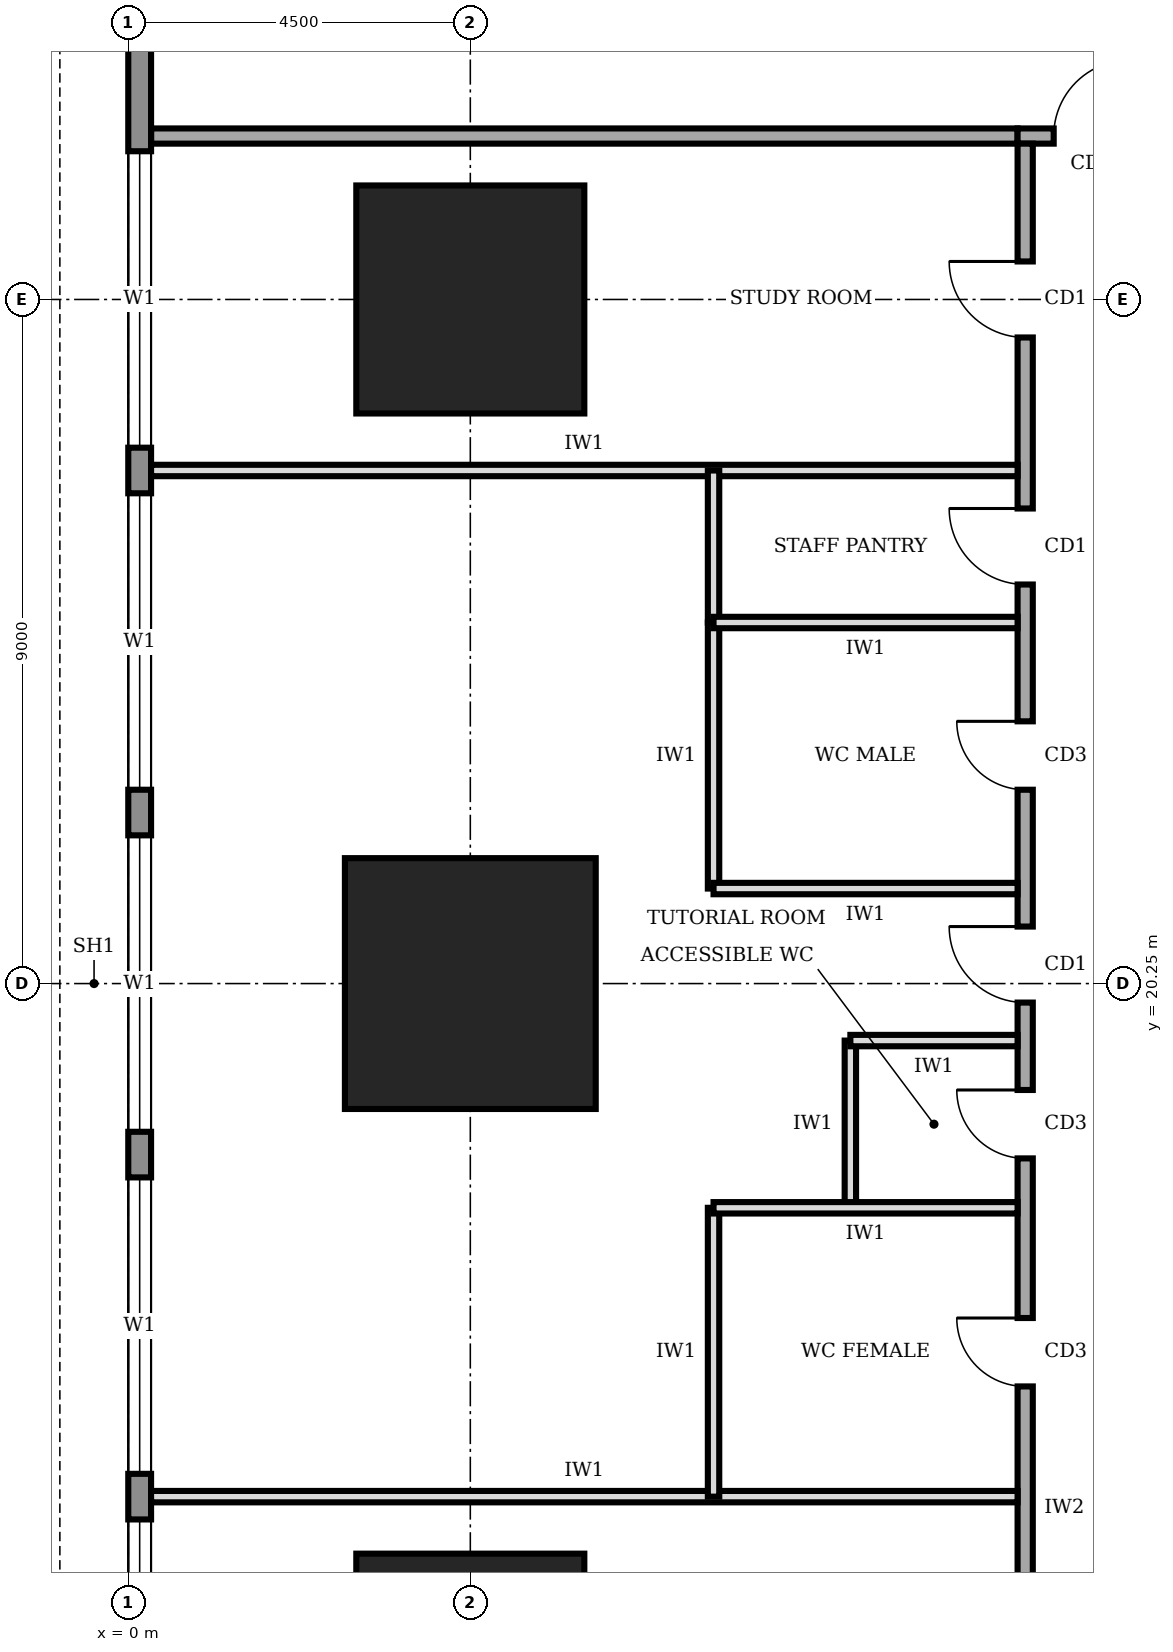
"""IFC4 building model, lengths in metres.
Left out: names, types, materials, properties, quantities, classifications, styles, units other than length and angle.
Written with IfcOpenShell. Run it as: python <this file> out.ifc"""

import sys

from ifc_helpers import new_model, si_unit, direction, frame, frame_2d, origin, origin_2d, place, context, subcontext, project, spatial, rectangle, extrude, element, fill, save


model = new_model("IFC4")
c1 = context("Model", 3, precision=1e-05, world=origin(), true_north=direction((0.0, 1.0)))
c2 = subcontext(c1, "Body", "Model", "MODEL_VIEW")
j1 = project(units=[si_unit("LENGTHUNIT", "METRE"), si_unit("PLANEANGLEUNIT", "RADIAN")], contexts=[c1])
p1 = place(None, origin())
s1 = spatial("IfcSite", under=j1, at=p1, CompositionType="ELEMENT")
p2 = place(p1, origin())
s2 = spatial("IfcBuilding", under=s1, at=p2, CompositionType="ELEMENT")
p3 = place(p2, frame((0.0, 0.0, 37.0)))
s3 = spatial("IfcBuildingStorey", under=s2, at=p3, CompositionType="ELEMENT", Elevation=37.0)
p4 = place(p3, frame((4.5, 11.25, 0.0), z_axis=(0.0, 0.0, 1.0), x_axis=(1.0, 0.0, 0.0)))
e1 = element("IfcColumn", 1, at=p4, inside=s3, PredefinedType="COLUMN", context=c2, shape_type="SweptSolid", body=[
    extrude(rectangle(XDim=3.0, YDim=3.0, at=origin_2d()), origin(), (0.0, 0.0, 1.0), 4.0),
])
p5 = place(p3, frame((4.5, 20.25, 0.0), z_axis=(0.0, 0.0, 1.0), x_axis=(1.0, 0.0, 0.0)))
e2 = element("IfcColumn", 2, at=p5, inside=s3, PredefinedType="COLUMN", context=c2, shape_type="SweptSolid", body=[
    extrude(rectangle(XDim=3.3, YDim=3.3, at=origin_2d()), origin(), (0.0, 0.0, 1.0), 4.0),
])
p6 = place(p3, frame((4.5, 29.25, 0.0), z_axis=(0.0, 0.0, 1.0), x_axis=(1.0, 0.0, 0.0)))
e3 = element("IfcColumn", 3, at=p6, inside=s3, PredefinedType="COLUMN", context=c2, shape_type="SweptSolid", body=[
    extrude(rectangle(XDim=3.0, YDim=3.0, at=origin_2d()), origin(), (0.0, 0.0, 1.0), 4.0),
])
p7 = place(p3, frame((0.15, 35.98, 0.0), z_axis=(0.0, 0.0, 1.0), x_axis=(0.0, -1.0, 0.0)))
e4 = element("IfcWall", 4, at=p7, inside=s3, PredefinedType="STANDARD", context=c2, shape_type="SweptSolid", body=[
    extrude(rectangle(XDim=31.46, YDim=0.3, at=frame_2d((15.73, 0.0))), origin(), (0.0, 0.0, 1.0), 3.75),
])
p8 = place(p7, frame((27.28, 0.0, 0.9)))
e5 = element("IfcOpeningElement", 5, at=p8, cuts=e4, PredefinedType="OPENING", context=c2, shape_type="SweptSolid", body=[
    extrude(rectangle(XDim=3.9, YDim=2.2, at=frame_2d((1.95, 1.1))), frame((0.0, 0.16, 0.0), z_axis=(0.0, -1.0, 0.0), x_axis=(1.0, 0.0, 0.0)), (0.0, 0.0, 1.0), 0.32),
])
p9 = place(p7, frame((22.78, 0.0, 0.9)))
e6 = element("IfcOpeningElement", 6, at=p9, cuts=e4, PredefinedType="OPENING", context=c2, shape_type="SweptSolid", body=[
    extrude(rectangle(XDim=3.9, YDim=2.2, at=frame_2d((1.95, 1.1))), frame((0.0, 0.16, 0.0), z_axis=(0.0, -1.0, 0.0), x_axis=(1.0, 0.0, 0.0)), (0.0, 0.0, 1.0), 0.32),
])
p10 = place(p7, frame((18.28, 0.0, 0.9)))
e7 = element("IfcOpeningElement", 7, at=p10, cuts=e4, PredefinedType="OPENING", context=c2, shape_type="SweptSolid", body=[
    extrude(rectangle(XDim=3.9, YDim=2.2, at=frame_2d((1.95, 1.1))), frame((0.0, 0.16, 0.0), z_axis=(0.0, -1.0, 0.0), x_axis=(1.0, 0.0, 0.0)), (0.0, 0.0, 1.0), 0.32),
])
p11 = place(p7, frame((13.78, 0.0, 0.9)))
e8 = element("IfcOpeningElement", 8, at=p11, cuts=e4, PredefinedType="OPENING", context=c2, shape_type="SweptSolid", body=[
    extrude(rectangle(XDim=3.9, YDim=2.2, at=frame_2d((1.95, 1.1))), frame((0.0, 0.16, 0.0), z_axis=(0.0, -1.0, 0.0), x_axis=(1.0, 0.0, 0.0)), (0.0, 0.0, 1.0), 0.32),
])
p12 = place(p7, frame((9.28, 0.0, 0.9)))
e9 = element("IfcOpeningElement", 9, at=p12, cuts=e4, PredefinedType="OPENING", context=c2, shape_type="SweptSolid", body=[
    extrude(rectangle(XDim=3.9, YDim=2.2, at=frame_2d((1.95, 1.1))), frame((0.0, 0.16, 0.0), z_axis=(0.0, -1.0, 0.0), x_axis=(1.0, 0.0, 0.0)), (0.0, 0.0, 1.0), 0.32),
])
p13 = place(p7, frame((4.78, 0.0, 0.9)))
e10 = element("IfcOpeningElement", 10, at=p13, cuts=e4, PredefinedType="OPENING", context=c2, shape_type="SweptSolid", body=[
    extrude(rectangle(XDim=3.9, YDim=2.2, at=frame_2d((1.95, 1.1))), frame((0.0, 0.16, 0.0), z_axis=(0.0, -1.0, 0.0), x_axis=(1.0, 0.0, 0.0)), (0.0, 0.0, 1.0), 0.32),
])
p14 = place(p3, frame((30.1, 31.4, 0.0), z_axis=(0.0, 0.0, 1.0), x_axis=(-1.0, 0.0, 0.0)))
e11 = element("IfcWall", 11, at=p14, inside=s3, PredefinedType="SOLIDWALL", context=c2, shape_type="SweptSolid", body=[
    extrude(rectangle(XDim=18.4, YDim=0.2, at=frame_2d((9.2, 0.0))), origin(), (0.0, 0.0, 1.0), 3.75),
])
p15 = place(p14, frame((16.925, 0.0, 0.0)))
e12 = element("IfcOpeningElement", 12, at=p15, cuts=e11, PredefinedType="OPENING", context=c2, shape_type="SweptSolid", body=[
    extrude(rectangle(XDim=1.0, YDim=2.1, at=frame_2d((0.5, 1.05))), frame((0.0, 0.11, 0.0), z_axis=(0.0, -1.0, 0.0), x_axis=(1.0, 0.0, 0.0)), (0.0, 0.0, 1.0), 0.22),
])
p16 = place(p14, frame((13.85, 0.0, 0.0)))
e13 = element("IfcOpeningElement", 13, at=p16, cuts=e11, PredefinedType="OPENING", context=c2, shape_type="SweptSolid", body=[
    extrude(rectangle(XDim=1.0, YDim=2.1, at=frame_2d((0.5, 1.05))), frame((0.0, 0.11, 0.0), z_axis=(0.0, -1.0, 0.0), x_axis=(1.0, 0.0, 0.0)), (0.0, 0.0, 1.0), 0.22),
])
p17 = place(p14, frame((7.1, 0.0, 0.0)))
e14 = element("IfcOpeningElement", 14, at=p17, cuts=e11, PredefinedType="OPENING", context=c2, shape_type="SweptSolid", body=[
    extrude(rectangle(XDim=1.0, YDim=2.1, at=frame_2d((0.5, 1.05))), frame((0.0, 0.11, 0.0), z_axis=(0.0, -1.0, 0.0), x_axis=(1.0, 0.0, 0.0)), (0.0, 0.0, 1.0), 0.22),
])
p18 = place(p14, frame((0.55, 0.0, 0.0)))
e15 = element("IfcOpeningElement", 15, at=p18, cuts=e11, PredefinedType="OPENING", context=c2, shape_type="SweptSolid", body=[
    extrude(rectangle(XDim=1.8, YDim=2.1, at=frame_2d((0.9, 1.05))), frame((0.0, 0.11, 0.0), z_axis=(0.0, -1.0, 0.0), x_axis=(1.0, 0.0, 0.0)), (0.0, 0.0, 1.0), 0.22),
])
p19 = place(p3, frame((11.8, 31.3, 0.0), z_axis=(0.0, 0.0, 1.0), x_axis=(0.0, -1.0, 0.0)))
e16 = element("IfcWall", 16, at=p19, inside=s3, PredefinedType="SOLIDWALL", context=c2, shape_type="SweptSolid", body=[
    extrude(rectangle(XDim=22.3, YDim=0.2, at=frame_2d((11.15, 0.0))), origin(), (0.0, 0.0, 1.0), 3.75),
])
p20 = place(p19, frame((19.55, 0.0, 0.0)))
e17 = element("IfcOpeningElement", 17, at=p20, cuts=e16, PredefinedType="OPENING", context=c2, shape_type="SweptSolid", body=[
    extrude(rectangle(XDim=1.0, YDim=2.1, at=frame_2d((0.5, 1.05))), frame((0.0, 0.11, 0.0), z_axis=(0.0, -1.0, 0.0), x_axis=(1.0, 0.0, 0.0)), (0.0, 0.0, 1.0), 0.22),
])
p21 = place(p19, frame((15.45, 0.0, 0.0)))
e18 = element("IfcOpeningElement", 18, at=p21, cuts=e16, PredefinedType="OPENING", context=c2, shape_type="SweptSolid", body=[
    extrude(rectangle(XDim=0.9, YDim=2.1, at=frame_2d((0.45, 1.05))), frame((0.0, 0.11, 0.0), z_axis=(0.0, -1.0, 0.0), x_axis=(1.0, 0.0, 0.0)), (0.0, 0.0, 1.0), 0.22),
])
p22 = place(p19, frame((12.45, 0.0, 0.0)))
e19 = element("IfcOpeningElement", 19, at=p22, cuts=e16, PredefinedType="OPENING", context=c2, shape_type="SweptSolid", body=[
    extrude(rectangle(XDim=0.9, YDim=2.1, at=frame_2d((0.45, 1.05))), frame((0.0, 0.11, 0.0), z_axis=(0.0, -1.0, 0.0), x_axis=(1.0, 0.0, 0.0)), (0.0, 0.0, 1.0), 0.22),
])
p23 = place(p19, frame((7.6, 0.0, 0.0)))
e20 = element("IfcOpeningElement", 20, at=p23, cuts=e16, PredefinedType="OPENING", context=c2, shape_type="SweptSolid", body=[
    extrude(rectangle(XDim=0.9, YDim=2.1, at=frame_2d((0.45, 1.05))), frame((0.0, 0.11, 0.0), z_axis=(0.0, -1.0, 0.0), x_axis=(1.0, 0.0, 0.0)), (0.0, 0.0, 1.0), 0.22),
])
p24 = place(p19, frame((4.8, 0.0, 0.0)))
e21 = element("IfcOpeningElement", 21, at=p24, cuts=e16, PredefinedType="OPENING", context=c2, shape_type="SweptSolid", body=[
    extrude(rectangle(XDim=1.0, YDim=2.1, at=frame_2d((0.5, 1.05))), frame((0.0, 0.11, 0.0), z_axis=(0.0, -1.0, 0.0), x_axis=(1.0, 0.0, 0.0)), (0.0, 0.0, 1.0), 0.22),
])
p25 = place(p19, frame((10.3, 0.0, 0.0)))
e22 = element("IfcOpeningElement", 22, at=p25, cuts=e16, PredefinedType="OPENING", context=c2, shape_type="SweptSolid", body=[
    extrude(rectangle(XDim=1.0, YDim=2.1, at=frame_2d((0.5, 1.05))), frame((0.0, 0.11, 0.0), z_axis=(0.0, -1.0, 0.0), x_axis=(1.0, 0.0, 0.0)), (0.0, 0.0, 1.0), 0.22),
])
p26 = place(p19, frame((1.55, 0.0, 0.0)))
e23 = element("IfcOpeningElement", 23, at=p26, cuts=e16, PredefinedType="OPENING", context=c2, shape_type="SweptSolid", body=[
    extrude(rectangle(XDim=1.0, YDim=2.1, at=frame_2d((0.5, 1.05))), frame((0.0, 0.11, 0.0), z_axis=(0.0, -1.0, 0.0), x_axis=(1.0, 0.0, 0.0)), (0.0, 0.0, 1.0), 0.22),
])
p27 = place(p3, frame((0.3, 31.4, 0.0), z_axis=(0.0, 0.0, 1.0), x_axis=(1.0, 0.0, 0.0)))
e24 = element("IfcWall", 24, at=p27, inside=s3, PredefinedType="SOLIDWALL", context=c2, shape_type="SweptSolid", body=[
    extrude(rectangle(XDim=11.4, YDim=0.2, at=frame_2d((5.7, 0.0))), origin(), (0.0, 0.0, 1.0), 3.75),
])
for number, where, z_axis, x_axis in (
    (25, (0.3, 13.5, 0.0), (0.0, 0.0, 1.0), (1.0, 0.0, 0.0)),
    (26, (0.3, 27.0, 0.0), (0.0, 0.0, 1.0), (1.0, 0.0, 0.0)),
):
    element("IfcWall", number, at=place(p3, frame(where, z_axis=z_axis, x_axis=x_axis)), inside=s3, PredefinedType="PARTITIONING", context=c2, shape_type="SweptSolid", body=[
        extrude(rectangle(XDim=11.4, YDim=0.15, at=frame_2d((5.7, 0.0))), origin(), (0.0, 0.0, 1.0), 3.75),
    ])
p28 = place(p3, frame((11.7, 17.3, 0.0), z_axis=(0.0, 0.0, 1.0), x_axis=(-1.0, 0.0, 0.0)))
e27 = element("IfcWall", 27, at=p28, inside=s3, PredefinedType="PARTITIONING", context=c2, shape_type="SweptSolid", body=[
    extrude(rectangle(XDim=4.0, YDim=0.15, at=frame_2d((2.0, 0.0))), origin(), (0.0, 0.0, 1.0), 3.75),
])
p29 = place(p3, frame((11.7, 19.5, 0.0), z_axis=(0.0, 0.0, 1.0), x_axis=(-1.0, 0.0, 0.0)))
e28 = element("IfcWall", 28, at=p29, inside=s3, PredefinedType="PARTITIONING", context=c2, shape_type="SweptSolid", body=[
    extrude(rectangle(XDim=2.2, YDim=0.15, at=frame_2d((1.1, 0.0))), origin(), (0.0, 0.0, 1.0), 2.85),
])
for number, where, z_axis, x_axis in (
    (29, (11.7, 21.5, 0.0), (0.0, 0.0, 1.0), (-1.0, 0.0, 0.0)),
    (30, (11.7, 25.0, 0.0), (0.0, 0.0, 1.0), (-1.0, 0.0, 0.0)),
):
    element("IfcWall", number, at=place(p3, frame(where, z_axis=z_axis, x_axis=x_axis)), inside=s3, PredefinedType="PARTITIONING", context=c2, shape_type="SweptSolid", body=[
        extrude(rectangle(XDim=4.0, YDim=0.15, at=frame_2d((2.0, 0.0))), origin(), (0.0, 0.0, 1.0), 3.75),
    ])
p30 = place(p3, frame((7.7, 13.5, 0.0), z_axis=(0.0, 0.0, 1.0), x_axis=(0.0, 1.0, 0.0)))
e31 = element("IfcWall", 31, at=p30, inside=s3, PredefinedType="PARTITIONING", context=c2, shape_type="SweptSolid", body=[
    extrude(rectangle(XDim=3.8, YDim=0.15, at=frame_2d((1.9, 0.0))), origin(), (0.0, 0.0, 1.0), 3.75),
])
p31 = place(p3, frame((9.5, 17.3, 0.0), z_axis=(0.0, 0.0, 1.0), x_axis=(0.0, 1.0, 0.0)))
e32 = element("IfcWall", 32, at=p31, inside=s3, PredefinedType="PARTITIONING", context=c2, shape_type="SweptSolid", body=[
    extrude(rectangle(XDim=2.2, YDim=0.15, at=frame_2d((1.1, 0.0))), origin(), (0.0, 0.0, 1.0), 3.75),
])
p32 = place(p3, frame((7.7, 21.5, 0.0), z_axis=(0.0, 0.0, 1.0), x_axis=(0.0, 1.0, 0.0)))
e33 = element("IfcWall", 33, at=p32, inside=s3, PredefinedType="PARTITIONING", context=c2, shape_type="SweptSolid", body=[
    extrude(rectangle(XDim=3.5, YDim=0.15, at=frame_2d((1.75, 0.0))), origin(), (0.0, 0.0, 1.0), 3.75),
])
p33 = place(p3, frame((7.7, 25.0, 0.0), z_axis=(0.0, 0.0, 1.0), x_axis=(0.0, 1.0, 0.0)))
e34 = element("IfcWall", 34, at=p33, inside=s3, PredefinedType="PARTITIONING", context=c2, shape_type="SweptSolid", body=[
    extrude(rectangle(XDim=2.0, YDim=0.15, at=frame_2d((1.0, 0.0))), origin(), (0.0, 0.0, 1.0), 3.75),
])
p34 = place(p9, origin())
e35 = element("IfcWindow", 35, at=p34, inside=s3, PartitioningType="SINGLE_PANEL", PredefinedType="WINDOW", context=c2, shape_type="SweptSolid", body=[
    extrude(rectangle(XDim=3.9, YDim=2.2, at=frame_2d((1.95, 1.1))), frame((0.0, 0.03, 0.0), z_axis=(0.0, -1.0, 0.0), x_axis=(1.0, 0.0, 0.0)), (0.0, 0.0, 1.0), 0.06),
])
fill(e6, e35)
p35 = place(p10, origin())
e36 = element("IfcWindow", 36, at=p35, inside=s3, PartitioningType="SINGLE_PANEL", PredefinedType="WINDOW", context=c2, shape_type="SweptSolid", body=[
    extrude(rectangle(XDim=3.9, YDim=2.2, at=frame_2d((1.95, 1.1))), frame((0.0, 0.03, 0.0), z_axis=(0.0, -1.0, 0.0), x_axis=(1.0, 0.0, 0.0)), (0.0, 0.0, 1.0), 0.06),
])
fill(e7, e36)
p36 = place(p11, origin())
e37 = element("IfcWindow", 37, at=p36, inside=s3, PartitioningType="SINGLE_PANEL", PredefinedType="WINDOW", context=c2, shape_type="SweptSolid", body=[
    extrude(rectangle(XDim=3.9, YDim=2.2, at=frame_2d((1.95, 1.1))), frame((0.0, 0.03, 0.0), z_axis=(0.0, -1.0, 0.0), x_axis=(1.0, 0.0, 0.0)), (0.0, 0.0, 1.0), 0.06),
])
fill(e8, e37)
p37 = place(p12, origin())
e38 = element("IfcWindow", 38, at=p37, inside=s3, PartitioningType="SINGLE_PANEL", PredefinedType="WINDOW", context=c2, shape_type="SweptSolid", body=[
    extrude(rectangle(XDim=3.9, YDim=2.2, at=frame_2d((1.95, 1.1))), frame((0.0, 0.03, 0.0), z_axis=(0.0, -1.0, 0.0), x_axis=(1.0, 0.0, 0.0)), (0.0, 0.0, 1.0), 0.06),
])
fill(e9, e38)
p38 = place(p13, origin())
e39 = element("IfcWindow", 39, at=p38, inside=s3, PartitioningType="SINGLE_PANEL", PredefinedType="WINDOW", context=c2, shape_type="SweptSolid", body=[
    extrude(rectangle(XDim=3.9, YDim=2.2, at=frame_2d((1.95, 1.1))), frame((0.0, 0.03, 0.0), z_axis=(0.0, -1.0, 0.0), x_axis=(1.0, 0.0, 0.0)), (0.0, 0.0, 1.0), 0.06),
])
fill(e10, e39)
p39 = place(p15, frame((1.0, 0.0, 0.0), z_axis=(0.0, 0.0, 1.0), x_axis=(-1.0, 0.0, 0.0)))
e40 = element("IfcDoor", 40, at=p39, inside=s3, OperationType="SINGLE_SWING_RIGHT", PredefinedType="DOOR", context=c2, shape_type="SweptSolid", body=[
    extrude(rectangle(XDim=1.0, YDim=2.1, at=frame_2d((0.5, 1.05))), frame((0.0, 0.025, 0.0), z_axis=(0.0, -1.0, 0.0), x_axis=(1.0, 0.0, 0.0)), (0.0, 0.0, 1.0), 0.05),
])
fill(e12, e40)
p40 = place(p21, frame((0.9, 0.0, 0.0), z_axis=(0.0, 0.0, 1.0), x_axis=(-1.0, 0.0, 0.0)))
e41 = element("IfcDoor", 41, at=p40, inside=s3, OperationType="SINGLE_SWING_RIGHT", PredefinedType="DOOR", context=c2, shape_type="SweptSolid", body=[
    extrude(rectangle(XDim=0.9, YDim=2.1, at=frame_2d((0.45, 1.05))), frame((0.0, 0.025, 0.0), z_axis=(0.0, -1.0, 0.0), x_axis=(1.0, 0.0, 0.0)), (0.0, 0.0, 1.0), 0.05),
])
fill(e18, e41)
p41 = place(p22, frame((0.9, 0.0, 0.0), z_axis=(0.0, 0.0, 1.0), x_axis=(-1.0, 0.0, 0.0)))
e42 = element("IfcDoor", 42, at=p41, inside=s3, OperationType="SINGLE_SWING_RIGHT", PredefinedType="DOOR", context=c2, shape_type="SweptSolid", body=[
    extrude(rectangle(XDim=0.9, YDim=2.1, at=frame_2d((0.45, 1.05))), frame((0.0, 0.025, 0.0), z_axis=(0.0, -1.0, 0.0), x_axis=(1.0, 0.0, 0.0)), (0.0, 0.0, 1.0), 0.05),
])
fill(e19, e42)
p42 = place(p23, frame((0.9, 0.0, 0.0), z_axis=(0.0, 0.0, 1.0), x_axis=(-1.0, 0.0, 0.0)))
e43 = element("IfcDoor", 43, at=p42, inside=s3, OperationType="SINGLE_SWING_RIGHT", PredefinedType="DOOR", context=c2, shape_type="SweptSolid", body=[
    extrude(rectangle(XDim=0.9, YDim=2.1, at=frame_2d((0.45, 1.05))), frame((0.0, 0.025, 0.0), z_axis=(0.0, -1.0, 0.0), x_axis=(1.0, 0.0, 0.0)), (0.0, 0.0, 1.0), 0.05),
])
fill(e20, e43)
p43 = place(p24, frame((1.0, 0.0, 0.0), z_axis=(0.0, 0.0, 1.0), x_axis=(-1.0, 0.0, 0.0)))
e44 = element("IfcDoor", 44, at=p43, inside=s3, OperationType="SINGLE_SWING_RIGHT", PredefinedType="DOOR", context=c2, shape_type="SweptSolid", body=[
    extrude(rectangle(XDim=1.0, YDim=2.1, at=frame_2d((0.5, 1.05))), frame((0.0, 0.025, 0.0), z_axis=(0.0, -1.0, 0.0), x_axis=(1.0, 0.0, 0.0)), (0.0, 0.0, 1.0), 0.05),
])
fill(e21, e44)
p44 = place(p25, frame((1.0, 0.0, 0.0), z_axis=(0.0, 0.0, 1.0), x_axis=(-1.0, 0.0, 0.0)))
e45 = element("IfcDoor", 45, at=p44, inside=s3, OperationType="SINGLE_SWING_RIGHT", PredefinedType="DOOR", context=c2, shape_type="SweptSolid", body=[
    extrude(rectangle(XDim=1.0, YDim=2.1, at=frame_2d((0.5, 1.05))), frame((0.0, 0.025, 0.0), z_axis=(0.0, -1.0, 0.0), x_axis=(1.0, 0.0, 0.0)), (0.0, 0.0, 1.0), 0.05),
])
fill(e22, e45)
p45 = place(p26, frame((1.0, 0.0, 0.0), z_axis=(0.0, 0.0, 1.0), x_axis=(-1.0, 0.0, 0.0)))
e46 = element("IfcDoor", 46, at=p45, inside=s3, OperationType="SINGLE_SWING_RIGHT", PredefinedType="DOOR", context=c2, shape_type="SweptSolid", body=[
    extrude(rectangle(XDim=1.0, YDim=2.1, at=frame_2d((0.5, 1.05))), frame((0.0, 0.025, 0.0), z_axis=(0.0, -1.0, 0.0), x_axis=(1.0, 0.0, 0.0)), (0.0, 0.0, 1.0), 0.05),
])
fill(e23, e46)
save(model, sys.argv[1])
